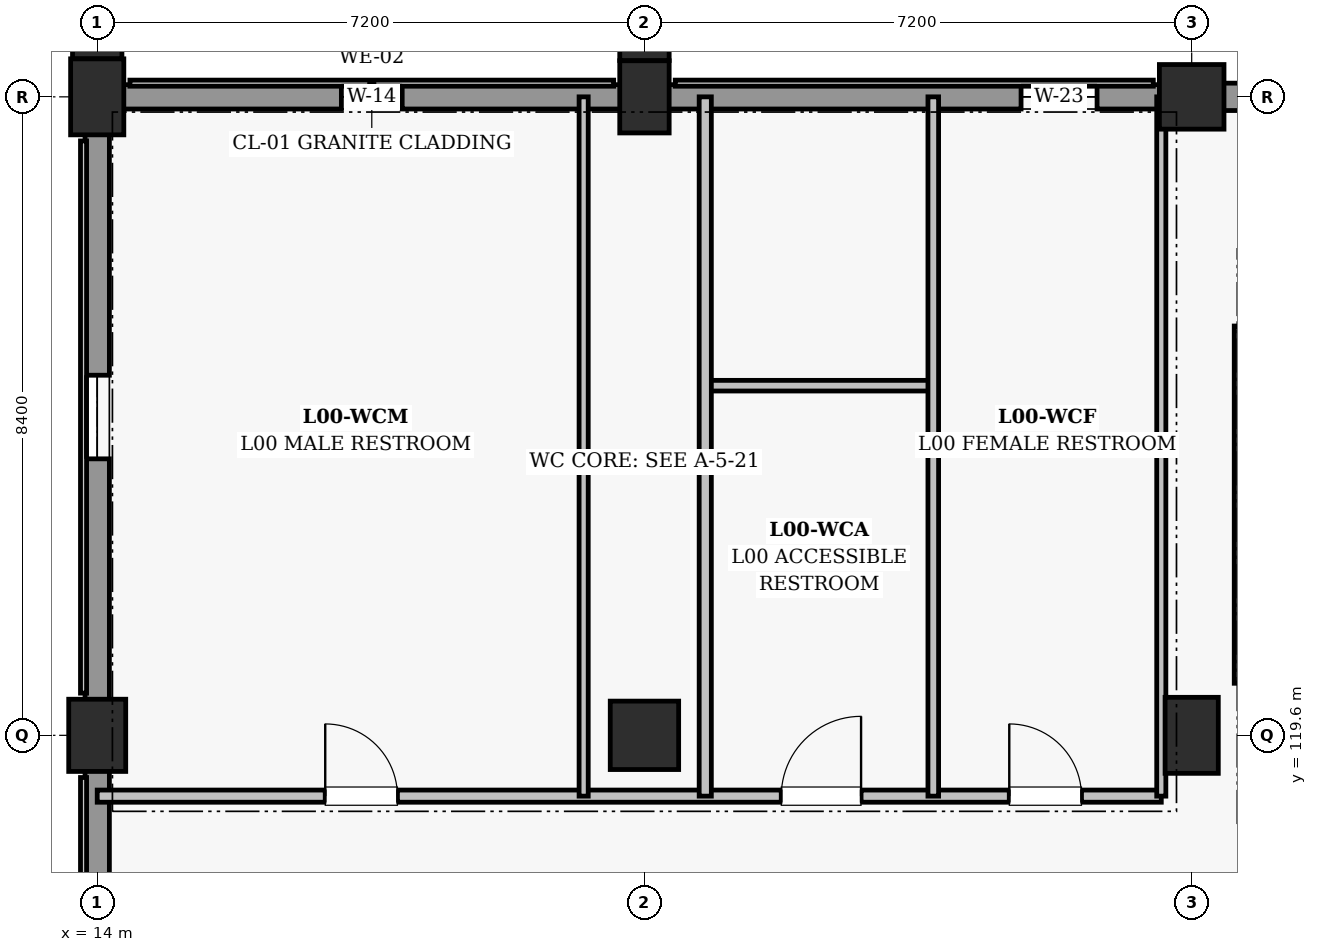
"""IFC4 building model, lengths in metres.
Left out: names, types, materials, properties, quantities, classifications, styles, units other than length and angle.
Written with IfcOpenShell. Run it as: python <this file> out.ifc"""

import sys

from ifc_helpers import new_model, si_unit, direction, frame, frame_2d, origin, origin_2d, place, context, subcontext, project, spatial, rectangle, extrude, element, fill, save


model = new_model("IFC4")
c1 = context("Model", 3, precision=1e-05, world=origin(), true_north=direction((0.0, 1.0)))
c2 = subcontext(c1, "Body", "Model", "MODEL_VIEW")
j1 = project(units=[si_unit("LENGTHUNIT", "METRE"), si_unit("PLANEANGLEUNIT", "RADIAN")], contexts=[c1])
p1 = place(None, origin())
s1 = spatial("IfcSite", under=j1, at=p1, CompositionType="ELEMENT")
p2 = place(p1, origin())
s2 = spatial("IfcBuilding", under=s1, at=p2, CompositionType="ELEMENT")
p3 = place(p2, origin())
s3 = spatial("IfcBuildingStorey", under=s2, at=p3, CompositionType="ELEMENT", Elevation=0.0)
p4 = place(p3, frame((14.0, 119.6, 0.0), z_axis=(0.0, 0.0, 1.0), x_axis=(1.0, 0.0, 0.0)))
e1 = element("IfcColumn", 1, at=p4, inside=s3, PredefinedType="COLUMN", context=c2, shape_type="SweptSolid", body=[
    extrude(rectangle(XDim=0.75, YDim=0.95, at=origin_2d()), origin(), (0.0, 0.0, 1.0), 5.4),
])
p5 = place(p3, frame((14.0, 128.0, 0.0), z_axis=(0.0, 0.0, 1.0), x_axis=(1.0, 0.0, 0.0)))
e2 = element("IfcColumn", 2, at=p5, inside=s3, PredefinedType="COLUMN", context=c2, shape_type="SweptSolid", body=[
    extrude(rectangle(XDim=0.7, YDim=1.0, at=origin_2d()), origin(), (0.0, 0.0, 1.0), 5.4),
])
p6 = place(p3, frame((21.2, 119.6, 0.0), z_axis=(0.0, 0.0, 1.0), x_axis=(1.0, 0.0, 0.0)))
e3 = element("IfcColumn", 3, at=p6, inside=s3, PredefinedType="COLUMN", context=c2, shape_type="SweptSolid", body=[
    extrude(rectangle(XDim=0.9, YDim=0.9, at=origin_2d()), origin(), (0.0, 0.0, 1.0), 5.4),
])
p7 = place(p3, frame((21.2, 128.0, 0.0), z_axis=(0.0, 0.0, 1.0), x_axis=(1.0, 0.0, 0.0)))
e4 = element("IfcColumn", 4, at=p7, inside=s3, PredefinedType="COLUMN", context=c2, shape_type="SweptSolid", body=[
    extrude(rectangle(XDim=0.65, YDim=0.95, at=origin_2d()), origin(), (0.0, 0.0, 1.0), 5.4),
])
p8 = place(p3, frame((28.4, 119.6, 0.0), z_axis=(0.0, 0.0, 1.0), x_axis=(1.0, 0.0, 0.0)))
e5 = element("IfcColumn", 5, at=p8, inside=s3, PredefinedType="COLUMN", context=c2, shape_type="SweptSolid", body=[
    extrude(rectangle(XDim=0.7, YDim=1.0, at=origin_2d()), origin(), (0.0, 0.0, 1.0), 5.4),
])
p9 = place(p3, frame((28.4, 128.0, 0.0), z_axis=(0.0, 0.0, 1.0), x_axis=(1.0, 0.0, 0.0)))
e6 = element("IfcColumn", 6, at=p9, inside=s3, PredefinedType="COLUMN", context=c2, shape_type="SweptSolid", body=[
    extrude(rectangle(XDim=0.85, YDim=0.85, at=origin_2d()), origin(), (0.0, 0.0, 1.0), 5.4),
])
for number, where, z_axis, x_axis in (
    (7, (14.0, 128.978, 0.0), (0.0, 0.0, 1.0), (1.0, 0.0, 0.0)),
    (8, (21.2, 128.953, 0.0), (0.0, 0.0, 1.0), (1.0, 0.0, 0.0)),
):
    element("IfcColumn", number, at=place(p3, frame(where, z_axis=z_axis, x_axis=x_axis)), inside=s3, PredefinedType="PILASTER", context=c2, shape_type="SweptSolid", body=[
        extrude(rectangle(XDim=0.65, YDim=0.95, at=origin_2d()), origin(), (0.0, 0.0, 1.0), 5.4),
    ])
p10 = place(p3, frame((14.33, 128.0, 0.0), z_axis=(0.0, 0.0, 1.0), x_axis=(1.0, 0.0, 0.0)))
e9 = element("IfcWall", 9, at=p10, inside=s3, PredefinedType="SOLIDWALL", context=c2, shape_type="SweptSolid", body=[
    extrude(rectangle(XDim=6.565, YDim=0.32, at=frame_2d((3.282, 0.0))), origin(), (0.0, 0.0, 1.0), 4.405),
])
p11 = place(p10, frame((2.883, 0.0, 0.95)))
e10 = element("IfcOpeningElement", 10, at=p11, cuts=e9, PredefinedType="OPENING", context=c2, shape_type="SweptSolid", body=[
    extrude(rectangle(XDim=0.8, YDim=2.0, at=frame_2d((0.4, 1.0))), frame((0.0, 0.17, 0.0), z_axis=(0.0, -1.0, 0.0), x_axis=(1.0, 0.0, 0.0)), (0.0, 0.0, 1.0), 0.34),
])
p12 = place(p3, frame((21.505, 128.0, 0.0), z_axis=(0.0, 0.0, 1.0), x_axis=(1.0, 0.0, 0.0)))
e11 = element("IfcWall", 11, at=p12, inside=s3, PredefinedType="SOLIDWALL", context=c2, shape_type="SweptSolid", body=[
    extrude(rectangle(XDim=6.49, YDim=0.32, at=frame_2d((3.245, 0.0))), origin(), (0.0, 0.0, 1.0), 4.355),
])
p13 = place(p12, frame((4.65, 0.0, 1.85)))
e12 = element("IfcOpeningElement", 12, at=p13, cuts=e11, PredefinedType="OPENING", context=c2, shape_type="SweptSolid", body=[
    extrude(rectangle(XDim=1.0, YDim=0.95, at=frame_2d((0.5, 0.475))), frame((0.0, 0.17, 0.0), z_axis=(0.0, -1.0, 0.0), x_axis=(1.0, 0.0, 0.0)), (0.0, 0.0, 1.0), 0.34),
])
p14 = place(p3, frame((28.805, 128.0, 0.0), z_axis=(0.0, 0.0, 1.0), x_axis=(1.0, 0.0, 0.0)))
e13 = element("IfcWall", 13, at=p14, inside=s3, PredefinedType="SOLIDWALL", context=c2, shape_type="SweptSolid", body=[
    extrude(rectangle(XDim=6.44, YDim=0.36, at=frame_2d((3.22, 0.0))), origin(), (0.0, 0.0, 1.0), 4.255),
])
p15 = place(p14, frame((2.22, 0.0, 0.0)))
e14 = element("IfcOpeningElement", 14, at=p15, cuts=e13, PredefinedType="OPENING", context=c2, shape_type="SweptSolid", body=[
    extrude(rectangle(XDim=2.0, YDim=2.4, at=frame_2d((1.0, 1.2))), frame((0.0, 0.19, 0.0), z_axis=(0.0, -1.0, 0.0), x_axis=(1.0, 0.0, 0.0)), (0.0, 0.0, 1.0), 0.38),
])
p16 = place(p3, frame((14.0, 111.63, 0.0), z_axis=(0.0, 0.0, 1.0), x_axis=(0.0, 1.0, 0.0)))
e15 = element("IfcWall", 15, at=p16, inside=s3, PredefinedType="SOLIDWALL", context=c2, shape_type="SweptSolid", body=[
    extrude(rectangle(XDim=7.515, YDim=0.32, at=frame_2d((3.758, 0.0))), origin(), (0.0, 0.0, 1.0), 4.455),
])
p17 = place(p16, frame((1.1, 0.0, 0.95)))
e16 = element("IfcOpeningElement", 16, at=p17, cuts=e15, PredefinedType="OPENING", context=c2, shape_type="SweptSolid", body=[
    extrude(rectangle(XDim=1.1, YDim=2.3, at=frame_2d((0.55, 1.15))), frame((0.0, 0.17, 0.0), z_axis=(0.0, -1.0, 0.0), x_axis=(1.0, 0.0, 0.0)), (0.0, 0.0, 1.0), 0.34),
])
p18 = place(p3, frame((14.0, 120.055, 0.0), z_axis=(0.0, 0.0, 1.0), x_axis=(0.0, 1.0, 0.0)))
e17 = element("IfcWall", 17, at=p18, inside=s3, PredefinedType="SOLIDWALL", context=c2, shape_type="SweptSolid", body=[
    extrude(rectangle(XDim=7.465, YDim=0.32, at=frame_2d((3.732, 0.0))), origin(), (0.0, 0.0, 1.0), 4.455),
])
p19 = place(p18, frame((3.183, 0.0, 0.95)))
e18 = element("IfcOpeningElement", 18, at=p19, cuts=e17, PredefinedType="OPENING", context=c2, shape_type="SweptSolid", body=[
    extrude(rectangle(XDim=1.1, YDim=2.3, at=frame_2d((0.55, 1.15))), frame((0.0, 0.17, 0.0), z_axis=(0.0, -1.0, 0.0), x_axis=(1.0, 0.0, 0.0)), (0.0, 0.0, 1.0), 0.34),
])
p20 = place(p3, frame((29.085, 124.985, 0.0), z_axis=(0.0, 0.0, 1.0), x_axis=(0.0, -1.0, 0.0)))
e19 = element("IfcWall", 19, at=p20, inside=s3, PredefinedType="SHEAR", context=c2, shape_type="SweptSolid", body=[
    extrude(rectangle(XDim=4.7, YDim=0.25, at=frame_2d((2.35, 0.0))), origin(), (0.0, 0.0, 1.0), 5.075),
])
p21 = place(p3, frame((14.0, 118.8, 0.0), z_axis=(0.0, 0.0, 1.0), x_axis=(1.0, 0.0, 0.0)))
e20 = element("IfcWall", 20, at=p21, inside=s3, PredefinedType="PARTITIONING", context=c2, shape_type="SweptSolid", body=[
    extrude(rectangle(XDim=14.0, YDim=0.16, at=frame_2d((7.0, 0.0))), origin(), (0.0, 0.0, 1.0), 4.26),
])
p22 = place(p21, frame((3.0, 0.0, 0.0)))
e21 = element("IfcOpeningElement", 21, at=p22, cuts=e20, PredefinedType="OPENING", context=c2, shape_type="SweptSolid", body=[
    extrude(rectangle(XDim=0.95, YDim=2.15, at=frame_2d((0.475, 1.075))), frame((0.0, 0.09, 0.0), z_axis=(0.0, -1.0, 0.0), x_axis=(1.0, 0.0, 0.0)), (0.0, 0.0, 1.0), 0.18),
])
p23 = place(p21, frame((9.0, 0.0, 0.0)))
e22 = element("IfcOpeningElement", 22, at=p23, cuts=e20, PredefinedType="OPENING", context=c2, shape_type="SweptSolid", body=[
    extrude(rectangle(XDim=1.05, YDim=2.15, at=frame_2d((0.525, 1.075))), frame((0.0, 0.09, 0.0), z_axis=(0.0, -1.0, 0.0), x_axis=(1.0, 0.0, 0.0)), (0.0, 0.0, 1.0), 0.18),
])
p24 = place(p21, frame((12.0, 0.0, 0.0)))
e23 = element("IfcOpeningElement", 23, at=p24, cuts=e20, PredefinedType="OPENING", context=c2, shape_type="SweptSolid", body=[
    extrude(rectangle(XDim=0.95, YDim=2.15, at=frame_2d((0.475, 1.075))), frame((0.0, 0.09, 0.0), z_axis=(0.0, -1.0, 0.0), x_axis=(1.0, 0.0, 0.0)), (0.0, 0.0, 1.0), 0.18),
])
p25 = place(p3, frame((22.0, 124.2, 0.0), z_axis=(0.0, 0.0, 1.0), x_axis=(1.0, 0.0, 0.0)))
e24 = element("IfcWall", 24, at=p25, inside=s3, PredefinedType="PARTITIONING", context=c2, shape_type="SweptSolid", body=[
    extrude(rectangle(XDim=3.0, YDim=0.14, at=frame_2d((1.5, 0.0))), origin(), (0.0, 0.0, 1.0), 4.46),
])
p26 = place(p3, frame((20.4, 118.8, 0.0), z_axis=(0.0, 0.0, 1.0), x_axis=(0.0, 1.0, 0.0)))
e25 = element("IfcWall", 25, at=p26, inside=s3, PredefinedType="PARTITIONING", context=c2, shape_type="SweptSolid", body=[
    extrude(rectangle(XDim=9.2, YDim=0.12, at=frame_2d((4.6, 0.0))), origin(), (0.0, 0.0, 1.0), 4.31),
])
p27 = place(p3, frame((22.0, 118.8, 0.0), z_axis=(0.0, 0.0, 1.0), x_axis=(0.0, 1.0, 0.0)))
e26 = element("IfcWall", 26, at=p27, inside=s3, PredefinedType="PARTITIONING", context=c2, shape_type="SweptSolid", body=[
    extrude(rectangle(XDim=9.2, YDim=0.16, at=frame_2d((4.6, 0.0))), origin(), (0.0, 0.0, 1.0), 4.26),
])
p28 = place(p3, frame((25.0, 118.8, 0.0), z_axis=(0.0, 0.0, 1.0), x_axis=(0.0, 1.0, 0.0)))
e27 = element("IfcWall", 27, at=p28, inside=s3, PredefinedType="PARTITIONING", context=c2, shape_type="SweptSolid", body=[
    extrude(rectangle(XDim=9.2, YDim=0.14, at=frame_2d((4.6, 0.0))), origin(), (0.0, 0.0, 1.0), 4.26),
])
p29 = place(p3, frame((28.0, 118.8, 0.0), z_axis=(0.0, 0.0, 1.0), x_axis=(0.0, 1.0, 0.0)))
e28 = element("IfcWall", 28, at=p29, inside=s3, PredefinedType="PARTITIONING", context=c2, shape_type="SweptSolid", body=[
    extrude(rectangle(XDim=9.2, YDim=0.12, at=frame_2d((4.6, 0.0))), origin(), (0.0, 0.0, 1.0), 4.26),
])
p30 = place(p11, origin())
e29 = element("IfcWindow", 29, at=p30, inside=s3, PartitioningType="SINGLE_PANEL", PredefinedType="WINDOW", context=c2, shape_type="SweptSolid", body=[
    extrude(rectangle(XDim=0.8, YDim=2.0, at=frame_2d((0.4, 1.0))), frame((0.0, 0.03, 0.0), z_axis=(0.0, -1.0, 0.0), x_axis=(1.0, 0.0, 0.0)), (0.0, 0.0, 1.0), 0.06),
])
fill(e10, e29)
p31 = place(p13, origin())
e30 = element("IfcWindow", 30, at=p31, inside=s3, PartitioningType="SINGLE_PANEL", PredefinedType="WINDOW", context=c2, shape_type="SweptSolid", body=[
    extrude(rectangle(XDim=1.0, YDim=0.95, at=frame_2d((0.5, 0.475))), frame((0.0, 0.03, 0.0), z_axis=(0.0, -1.0, 0.0), x_axis=(1.0, 0.0, 0.0)), (0.0, 0.0, 1.0), 0.06),
])
fill(e12, e30)
p32 = place(p19, origin())
e31 = element("IfcWindow", 31, at=p32, inside=s3, PartitioningType="SINGLE_PANEL", PredefinedType="WINDOW", context=c2, shape_type="SweptSolid", body=[
    extrude(rectangle(XDim=1.1, YDim=2.3, at=frame_2d((0.55, 1.15))), frame((0.0, 0.03, 0.0), z_axis=(0.0, -1.0, 0.0), x_axis=(1.0, 0.0, 0.0)), (0.0, 0.0, 1.0), 0.06),
])
fill(e18, e31)
p33 = place(p22, origin())
e32 = element("IfcDoor", 32, at=p33, inside=s3, OperationType="SINGLE_SWING_LEFT", PredefinedType="DOOR", context=c2, shape_type="SweptSolid", body=[
    extrude(rectangle(XDim=0.95, YDim=2.15, at=frame_2d((0.475, 1.075))), frame((0.0, 0.025, 0.0), z_axis=(0.0, -1.0, 0.0), x_axis=(1.0, 0.0, 0.0)), (0.0, 0.0, 1.0), 0.05),
])
fill(e21, e32)
p34 = place(p23, origin())
e33 = element("IfcDoor", 33, at=p34, inside=s3, OperationType="SINGLE_SWING_RIGHT", PredefinedType="DOOR", context=c2, shape_type="SweptSolid", body=[
    extrude(rectangle(XDim=1.05, YDim=2.15, at=frame_2d((0.525, 1.075))), frame((0.0, 0.025, 0.0), z_axis=(0.0, -1.0, 0.0), x_axis=(1.0, 0.0, 0.0)), (0.0, 0.0, 1.0), 0.05),
])
fill(e22, e33)
p35 = place(p24, origin())
e34 = element("IfcDoor", 34, at=p35, inside=s3, OperationType="SINGLE_SWING_LEFT", PredefinedType="DOOR", context=c2, shape_type="SweptSolid", body=[
    extrude(rectangle(XDim=0.95, YDim=2.15, at=frame_2d((0.475, 1.075))), frame((0.0, 0.025, 0.0), z_axis=(0.0, -1.0, 0.0), x_axis=(1.0, 0.0, 0.0)), (0.0, 0.0, 1.0), 0.05),
])
fill(e23, e34)
save(model, sys.argv[1])
